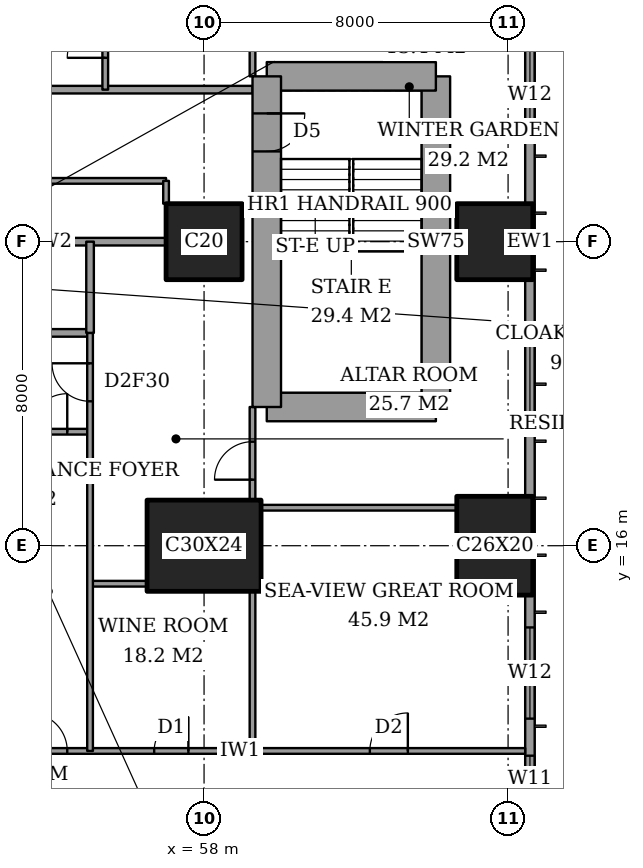
"""IFC4 building model, lengths in metres.
Left out: names, types, materials, properties, quantities, classifications, styles, units other than length and angle.
Written with IfcOpenShell. Run it as: python <this file> out.ifc"""

import sys

from ifc_helpers import new_model, si_unit, direction, frame, frame_2d, origin, origin_2d, place, context, subcontext, project, spatial, rectangle, extrude, element, fill, save


model = new_model("IFC4")
c1 = context("Model", 3, precision=1e-05, world=origin(), true_north=direction((0.0, 1.0)))
c2 = subcontext(c1, "Body", "Model", "MODEL_VIEW")
j1 = project(units=[si_unit("LENGTHUNIT", "METRE"), si_unit("PLANEANGLEUNIT", "RADIAN")], contexts=[c1])
p1 = place(None, origin())
s1 = spatial("IfcSite", under=j1, at=p1, CompositionType="ELEMENT")
p2 = place(p1, origin())
s2 = spatial("IfcBuilding", under=s1, at=p2, CompositionType="ELEMENT")
p3 = place(p2, frame((0.0, 0.0, 139.4)))
s3 = spatial("IfcBuildingStorey", under=s2, at=p3, CompositionType="ELEMENT", Elevation=139.4)
p4 = place(p3, frame((58.0, 16.0, 0.0), z_axis=(0.0, 0.0, 1.0), x_axis=(1.0, 0.0, 0.0)))
e1 = element("IfcColumn", 1, at=p4, inside=s3, PredefinedType="COLUMN", context=c2, shape_type="SweptSolid", body=[
    extrude(rectangle(XDim=3.0, YDim=2.4, at=origin_2d()), origin(), (0.0, 0.0, 1.0), 3.6),
])
p5 = place(p3, frame((58.0, 24.0, 0.0), z_axis=(0.0, 0.0, 1.0), x_axis=(1.0, 0.0, 0.0)))
e2 = element("IfcColumn", 2, at=p5, inside=s3, PredefinedType="COLUMN", context=c2, shape_type="SweptSolid", body=[
    extrude(rectangle(XDim=2.0, YDim=2.0, at=origin_2d()), origin(), (0.0, 0.0, 1.0), 3.6),
])
p6 = place(p3, frame((65.65, 16.0, 0.0), z_axis=(0.0, 0.0, 1.0), x_axis=(0.0, 1.0, 0.0)))
e3 = element("IfcColumn", 3, at=p6, inside=s3, PredefinedType="COLUMN", context=c2, shape_type="SweptSolid", body=[
    extrude(rectangle(XDim=2.6, YDim=2.0, at=origin_2d()), origin(), (0.0, 0.0, 1.0), 3.6),
])
p7 = place(p3, frame((65.65, 24.0, 0.0), z_axis=(0.0, 0.0, 1.0), x_axis=(1.0, 0.0, 0.0)))
e4 = element("IfcColumn", 4, at=p7, inside=s3, PredefinedType="COLUMN", context=c2, shape_type="SweptSolid", body=[
    extrude(rectangle(XDim=2.0, YDim=2.0, at=origin_2d()), origin(), (0.0, 0.0, 1.0), 3.6),
])
p8 = place(p3, frame((59.65, 19.65, 0.0), z_axis=(0.0, 0.0, 1.0), x_axis=(1.0, 0.0, 0.0)))
e5 = element("IfcWall", 5, at=p8, inside=s3, PredefinedType="SHEAR", context=c2, shape_type="SweptSolid", body=[
    extrude(rectangle(XDim=4.45, YDim=0.75, at=frame_2d((2.225, 0.0))), origin(), (0.0, 0.0, 1.0), 3.6),
])
p9 = place(p3, frame((64.1, 19.65, 0.0), z_axis=(0.0, 0.0, 1.0), x_axis=(0.0, 1.0, 0.0)))
e6 = element("IfcWall", 6, at=p9, inside=s3, PredefinedType="SHEAR", context=c2, shape_type="SweptSolid", body=[
    extrude(rectangle(XDim=8.7, YDim=0.75, at=frame_2d((4.35, 0.0))), origin(), (0.0, 0.0, 1.0), 3.6),
])
p10 = place(p3, frame((64.1, 28.35, 0.0), z_axis=(0.0, 0.0, 1.0), x_axis=(-1.0, 0.0, 0.0)))
e7 = element("IfcWall", 7, at=p10, inside=s3, PredefinedType="SHEAR", context=c2, shape_type="SweptSolid", body=[
    extrude(rectangle(XDim=4.45, YDim=0.75, at=frame_2d((2.225, 0.0))), origin(), (0.0, 0.0, 1.0), 3.6),
])
p11 = place(p3, frame((59.65, 28.35, 0.0), z_axis=(0.0, 0.0, 1.0), x_axis=(0.0, -1.0, 0.0)))
e8 = element("IfcWall", 8, at=p11, inside=s3, PredefinedType="SHEAR", context=c2, shape_type="SweptSolid", body=[
    extrude(rectangle(XDim=8.7, YDim=0.75, at=frame_2d((4.35, 0.0))), origin(), (0.0, 0.0, 1.0), 3.6),
])
p12 = place(p11, frame((0.975, 0.0, 0.0)))
e9 = element("IfcOpeningElement", 9, at=p12, cuts=e8, PredefinedType="OPENING", context=c2, shape_type="SweptSolid", body=[
    extrude(rectangle(XDim=1.0, YDim=2.1, at=frame_2d((0.5, 1.05))), frame((0.0, 0.385, 0.0), z_axis=(0.0, -1.0, 0.0), x_axis=(1.0, 0.0, 0.0)), (0.0, 0.0, 1.0), 0.77),
])
p13 = place(p3, frame((66.575, 3.175, 0.0), z_axis=(0.0, 0.0, 1.0), x_axis=(0.0, 1.0, 0.0)))
e10 = element("IfcWall", 10, at=p13, inside=s3, PredefinedType="SOLIDWALL", context=c2, shape_type="SweptSolid", body=[
    extrude(rectangle(XDim=41.65, YDim=0.25, at=frame_2d((20.825, 0.0))), origin(), (0.0, 0.0, 1.0), 3.6),
])
p14 = place(p13, frame((0.775, 0.0, 0.4)))
e11 = element("IfcOpeningElement", 11, at=p14, cuts=e10, PredefinedType="OPENING", context=c2, shape_type="SweptSolid", body=[
    extrude(rectangle(XDim=2.4, YDim=2.2, at=frame_2d((1.2, 1.1))), frame((0.0, 0.135, 0.0), z_axis=(0.0, -1.0, 0.0), x_axis=(1.0, 0.0, 0.0)), (0.0, 0.0, 1.0), 0.27),
])
p15 = place(p13, frame((6.1, 0.0, 0.4)))
e12 = element("IfcOpeningElement", 12, at=p15, cuts=e10, PredefinedType="OPENING", context=c2, shape_type="SweptSolid", body=[
    extrude(rectangle(XDim=1.2, YDim=2.2, at=frame_2d((0.6, 1.1))), frame((0.0, 0.135, 0.0), z_axis=(0.0, -1.0, 0.0), x_axis=(1.0, 0.0, 0.0)), (0.0, 0.0, 1.0), 0.27),
])
p16 = place(p13, frame((8.275, 0.0, 0.4)))
e13 = element("IfcOpeningElement", 13, at=p16, cuts=e10, PredefinedType="OPENING", context=c2, shape_type="SweptSolid", body=[
    extrude(rectangle(XDim=2.4, YDim=2.2, at=frame_2d((1.2, 1.1))), frame((0.0, 0.135, 0.0), z_axis=(0.0, -1.0, 0.0), x_axis=(1.0, 0.0, 0.0)), (0.0, 0.0, 1.0), 0.27),
])
p17 = place(p13, frame((15.775, 0.0, 0.4)))
e14 = element("IfcOpeningElement", 14, at=p17, cuts=e10, PredefinedType="OPENING", context=c2, shape_type="SweptSolid", body=[
    extrude(rectangle(XDim=2.4, YDim=2.2, at=frame_2d((1.2, 1.1))), frame((0.0, 0.135, 0.0), z_axis=(0.0, -1.0, 0.0), x_axis=(1.0, 0.0, 0.0)), (0.0, 0.0, 1.0), 0.27),
])
p18 = place(p13, frame((23.475, 0.0, 0.4)))
e15 = element("IfcOpeningElement", 15, at=p18, cuts=e10, PredefinedType="OPENING", context=c2, shape_type="SweptSolid", body=[
    extrude(rectangle(XDim=2.4, YDim=2.2, at=frame_2d((1.2, 1.1))), frame((0.0, 0.135, 0.0), z_axis=(0.0, -1.0, 0.0), x_axis=(1.0, 0.0, 0.0)), (0.0, 0.0, 1.0), 0.27),
])
p19 = place(p13, frame((30.975, 0.0, 0.4)))
e16 = element("IfcOpeningElement", 16, at=p19, cuts=e10, PredefinedType="OPENING", context=c2, shape_type="SweptSolid", body=[
    extrude(rectangle(XDim=2.4, YDim=2.2, at=frame_2d((1.2, 1.1))), frame((0.0, 0.135, 0.0), z_axis=(0.0, -1.0, 0.0), x_axis=(1.0, 0.0, 0.0)), (0.0, 0.0, 1.0), 0.27),
])
p20 = place(p13, frame((34.5, 0.0, 0.4)))
e17 = element("IfcOpeningElement", 17, at=p20, cuts=e10, PredefinedType="OPENING", context=c2, shape_type="SweptSolid", body=[
    extrude(rectangle(XDim=1.2, YDim=2.2, at=frame_2d((0.6, 1.1))), frame((0.0, 0.135, 0.0), z_axis=(0.0, -1.0, 0.0), x_axis=(1.0, 0.0, 0.0)), (0.0, 0.0, 1.0), 0.27),
])
p21 = place(p13, frame((38.475, 0.0, 0.4)))
e18 = element("IfcOpeningElement", 18, at=p21, cuts=e10, PredefinedType="OPENING", context=c2, shape_type="SweptSolid", body=[
    extrude(rectangle(XDim=2.4, YDim=2.2, at=frame_2d((1.2, 1.1))), frame((0.0, 0.135, 0.0), z_axis=(0.0, -1.0, 0.0), x_axis=(1.0, 0.0, 0.0)), (0.0, 0.0, 1.0), 0.27),
])
p22 = place(p3, frame((41.439, 10.6, 0.0), z_axis=(0.0, 0.0, 1.0), x_axis=(1.0, 0.0, 0.0)))
e19 = element("IfcWall", 19, at=p22, inside=s3, PredefinedType="PARTITIONING", context=c2, shape_type="SweptSolid", body=[
    extrude(rectangle(XDim=25.011, YDim=0.15, at=frame_2d((12.505, 0.0))), origin(), (0.0, 0.0, 1.0), 3.35),
])
p23 = place(p22, frame((11.961, 0.0, 0.0)))
e20 = element("IfcOpeningElement", 20, at=p23, cuts=e19, PredefinedType="OPENING", context=c2, shape_type="SweptSolid", body=[
    extrude(rectangle(XDim=1.0, YDim=2.1, at=frame_2d((0.5, 1.05))), frame((0.0, 0.085, 0.0), z_axis=(0.0, -1.0, 0.0), x_axis=(1.0, 0.0, 0.0)), (0.0, 0.0, 1.0), 0.17),
])
p24 = place(p22, frame((20.924, 0.0, 0.0)))
e21 = element("IfcOpeningElement", 21, at=p24, cuts=e19, PredefinedType="OPENING", context=c2, shape_type="SweptSolid", body=[
    extrude(rectangle(XDim=1.0, YDim=2.1, at=frame_2d((0.5, 1.05))), frame((0.0, 0.085, 0.0), z_axis=(0.0, -1.0, 0.0), x_axis=(1.0, 0.0, 0.0)), (0.0, 0.0, 1.0), 0.17),
])
p25 = place(p22, frame((15.249, 0.0, 0.0)))
e22 = element("IfcOpeningElement", 22, at=p25, cuts=e19, PredefinedType="OPENING", context=c2, shape_type="SweptSolid", body=[
    extrude(rectangle(XDim=0.9, YDim=2.1, at=frame_2d((0.45, 1.05))), frame((0.0, 0.085, 0.0), z_axis=(0.0, -1.0, 0.0), x_axis=(1.0, 0.0, 0.0)), (0.0, 0.0, 1.0), 0.17),
])
p26 = place(p22, frame((9.661, 0.0, 0.0)))
e23 = element("IfcOpeningElement", 23, at=p26, cuts=e19, PredefinedType="OPENING", context=c2, shape_type="SweptSolid", body=[
    extrude(rectangle(XDim=1.0, YDim=2.1, at=frame_2d((0.5, 1.05))), frame((0.0, 0.085, 0.0), z_axis=(0.0, -1.0, 0.0), x_axis=(1.0, 0.0, 0.0)), (0.0, 0.0, 1.0), 0.17),
])
p27 = place(p22, frame((7.311, 0.0, 0.0)))
e24 = element("IfcOpeningElement", 24, at=p27, cuts=e19, PredefinedType="OPENING", context=c2, shape_type="SweptSolid", body=[
    extrude(rectangle(XDim=0.9, YDim=2.1, at=frame_2d((0.45, 1.05))), frame((0.0, 0.085, 0.0), z_axis=(0.0, -1.0, 0.0), x_axis=(1.0, 0.0, 0.0)), (0.0, 0.0, 1.0), 0.17),
])
p28 = place(p22, frame((2.836, 0.0, 0.0)))
e25 = element("IfcOpeningElement", 25, at=p28, cuts=e19, PredefinedType="OPENING", context=c2, shape_type="SweptSolid", body=[
    extrude(rectangle(XDim=1.0, YDim=2.1, at=frame_2d((0.5, 1.05))), frame((0.0, 0.085, 0.0), z_axis=(0.0, -1.0, 0.0), x_axis=(1.0, 0.0, 0.0)), (0.0, 0.0, 1.0), 0.17),
])
p29 = place(p3, frame((55.0, 15.0, 0.0), z_axis=(0.0, 0.0, 1.0), x_axis=(1.0, 0.0, 0.0)))
e26 = element("IfcWall", 26, at=p29, inside=s3, PredefinedType="PARTITIONING", context=c2, shape_type="SweptSolid", body=[
    extrude(rectangle(XDim=1.5, YDim=0.15, at=frame_2d((0.75, 0.0))), origin(), (0.0, 0.0, 1.0), 3.35),
])
p30 = place(p3, frame((59.5, 17.0, 0.0), z_axis=(0.0, 0.0, 1.0), x_axis=(1.0, 0.0, 0.0)))
e27 = element("IfcWall", 27, at=p30, inside=s3, PredefinedType="PARTITIONING", context=c2, shape_type="SweptSolid", body=[
    extrude(rectangle(XDim=5.15, YDim=0.15, at=frame_2d((2.575, 0.0))), origin(), (0.0, 0.0, 1.0), 3.35),
])
p31 = place(p3, frame((51.6, 19.0, 0.0), z_axis=(0.0, 0.0, 1.0), x_axis=(1.0, 0.0, 0.0)))
e28 = element("IfcWall", 28, at=p31, inside=s3, PredefinedType="PARTITIONING", context=c2, shape_type="SweptSolid", body=[
    extrude(rectangle(XDim=3.4, YDim=0.15, at=frame_2d((1.7, 0.0))), origin(), (0.0, 0.0, 1.0), 3.35),
])
p32 = place(p31, frame((1.8, 0.0, 0.0)))
e29 = element("IfcOpeningElement", 29, at=p32, cuts=e28, PredefinedType="OPENING", context=c2, shape_type="SweptSolid", body=[
    extrude(rectangle(XDim=1.0, YDim=2.1, at=frame_2d((0.5, 1.05))), frame((0.0, 0.085, 0.0), z_axis=(0.0, -1.0, 0.0), x_axis=(1.0, 0.0, 0.0)), (0.0, 0.0, 1.0), 0.17),
])
p33 = place(p3, frame((51.2, 21.6, 0.0), z_axis=(0.0, 0.0, 1.0), x_axis=(1.0, 0.0, 0.0)))
e30 = element("IfcWall", 30, at=p33, inside=s3, PredefinedType="PARTITIONING", context=c2, shape_type="SweptSolid", body=[
    extrude(rectangle(XDim=3.8, YDim=0.2, at=frame_2d((1.9, 0.0))), origin(), (0.0, 0.0, 1.0), 3.35),
])
p34 = place(p33, frame((1.45, 0.0, 0.0)))
e31 = element("IfcOpeningElement", 31, at=p34, cuts=e30, PredefinedType="OPENING", context=c2, shape_type="SweptSolid", body=[
    extrude(rectangle(XDim=0.9, YDim=2.1, at=frame_2d((0.45, 1.05))), frame((0.0, 0.11, 0.0), z_axis=(0.0, -1.0, 0.0), x_axis=(1.0, 0.0, 0.0)), (0.0, 0.0, 1.0), 0.22),
])
p35 = place(p3, frame((51.0, 24.0, 0.0), z_axis=(0.0, 0.0, 1.0), x_axis=(1.0, 0.0, 0.0)))
e32 = element("IfcWall", 32, at=p35, inside=s3, PredefinedType="PARTITIONING", context=c2, shape_type="SweptSolid", body=[
    extrude(rectangle(XDim=6.0, YDim=0.2, at=frame_2d((3.0, 0.0))), origin(), (0.0, 0.0, 1.0), 3.35),
])
p36 = place(p3, frame((48.6, 25.6, 0.0), z_axis=(0.0, 0.0, 1.0), x_axis=(1.0, 0.0, 0.0)))
e33 = element("IfcWall", 33, at=p36, inside=s3, PredefinedType="PARTITIONING", context=c2, shape_type="SweptSolid", body=[
    extrude(rectangle(XDim=8.4, YDim=0.15, at=frame_2d((4.2, 0.0))), origin(), (0.0, 0.0, 1.0), 3.35),
])
p37 = place(p36, frame((3.75, 0.0, 0.0)))
e34 = element("IfcOpeningElement", 34, at=p37, cuts=e33, PredefinedType="OPENING", context=c2, shape_type="SweptSolid", body=[
    extrude(rectangle(XDim=0.9, YDim=2.1, at=frame_2d((0.45, 1.05))), frame((0.0, 0.085, 0.0), z_axis=(0.0, -1.0, 0.0), x_axis=(1.0, 0.0, 0.0)), (0.0, 0.0, 1.0), 0.17),
])
p38 = place(p3, frame((42.0, 28.0, 0.0), z_axis=(0.0, 0.0, 1.0), x_axis=(1.0, 0.0, 0.0)))
e35 = element("IfcWall", 35, at=p38, inside=s3, PredefinedType="PARTITIONING", context=c2, shape_type="SweptSolid", body=[
    extrude(rectangle(XDim=17.275, YDim=0.2, at=frame_2d((8.637, 0.0))), origin(), (0.0, 0.0, 1.0), 3.35),
])
p39 = place(p38, frame((9.1, 0.0, 0.0)))
e36 = element("IfcOpeningElement", 36, at=p39, cuts=e35, PredefinedType="OPENING", context=c2, shape_type="SweptSolid", body=[
    extrude(rectangle(XDim=1.2, YDim=2.4, at=frame_2d((0.6, 1.2))), frame((0.0, 0.11, 0.0), z_axis=(0.0, -1.0, 0.0), x_axis=(1.0, 0.0, 0.0)), (0.0, 0.0, 1.0), 0.22),
])
p40 = place(p3, frame((55.0, 21.6, 0.0), z_axis=(0.0, 0.0, 1.0), x_axis=(0.0, 1.0, 0.0)))
e37 = element("IfcWall", 37, at=p40, inside=s3, PredefinedType="PARTITIONING", context=c2, shape_type="SweptSolid", body=[
    extrude(rectangle(XDim=2.4, YDim=0.2, at=frame_2d((1.2, 0.0))), origin(), (0.0, 0.0, 1.0), 3.35),
])
p41 = place(p3, frame((55.0, 10.6, 0.0), z_axis=(0.0, 0.0, 1.0), x_axis=(0.0, 1.0, 0.0)))
e38 = element("IfcWall", 38, at=p41, inside=s3, PredefinedType="PARTITIONING", context=c2, shape_type="SweptSolid", body=[
    extrude(rectangle(XDim=11.0, YDim=0.15, at=frame_2d((5.5, 0.0))), origin(), (0.0, 0.0, 1.0), 3.35),
])
p42 = place(p41, frame((9.2, 0.0, 0.0)))
e39 = element("IfcOpeningElement", 39, at=p42, cuts=e38, PredefinedType="OPENING", context=c2, shape_type="SweptSolid", body=[
    extrude(rectangle(XDim=1.0, YDim=2.1, at=frame_2d((0.5, 1.05))), frame((0.0, 0.085, 0.0), z_axis=(0.0, -1.0, 0.0), x_axis=(1.0, 0.0, 0.0)), (0.0, 0.0, 1.0), 0.17),
])
p43 = place(p3, frame((55.4, 28.0, 0.0), z_axis=(0.0, 0.0, 1.0), x_axis=(0.0, 1.0, 0.0)))
e40 = element("IfcWall", 40, at=p43, inside=s3, PredefinedType="PARTITIONING", context=c2, shape_type="SweptSolid", body=[
    extrude(rectangle(XDim=9.4, YDim=0.15, at=frame_2d((4.7, 0.0))), origin(), (0.0, 0.0, 1.0), 3.35),
])
p44 = place(p43, frame((0.837, 0.0, 0.0)))
e41 = element("IfcOpeningElement", 41, at=p44, cuts=e40, PredefinedType="OPENING", context=c2, shape_type="SweptSolid", body=[
    extrude(rectangle(XDim=1.0, YDim=2.1, at=frame_2d((0.5, 1.05))), frame((0.0, 0.085, 0.0), z_axis=(0.0, -1.0, 0.0), x_axis=(1.0, 0.0, 0.0)), (0.0, 0.0, 1.0), 0.17),
])
p45 = place(p3, frame((57.0, 25.0, 0.0), z_axis=(0.0, 0.0, 1.0), x_axis=(0.0, 1.0, 0.0)))
e42 = element("IfcWall", 42, at=p45, inside=s3, PredefinedType="PARTITIONING", context=c2, shape_type="SweptSolid", body=[
    extrude(rectangle(XDim=0.6, YDim=0.15, at=frame_2d((0.3, 0.0))), origin(), (0.0, 0.0, 1.0), 3.35),
])
p46 = place(p3, frame((59.275, 10.6, 0.0), z_axis=(0.0, 0.0, 1.0), x_axis=(0.0, 1.0, 0.0)))
e43 = element("IfcWall", 43, at=p46, inside=s3, PredefinedType="PARTITIONING", context=c2, shape_type="SweptSolid", body=[
    extrude(rectangle(XDim=4.2, YDim=0.15, at=frame_2d((2.1, 0.0))), origin(), (0.0, 0.0, 1.0), 3.35),
])
p47 = place(p3, frame((59.275, 17.2, 0.0), z_axis=(0.0, 0.0, 1.0), x_axis=(0.0, 1.0, 0.0)))
e44 = element("IfcWall", 44, at=p47, inside=s3, PredefinedType="PARTITIONING", context=c2, shape_type="SweptSolid", body=[
    extrude(rectangle(XDim=2.45, YDim=0.15, at=frame_2d((1.225, 0.0))), origin(), (0.0, 0.0, 1.0), 3.35),
])
p48 = place(p47, frame((0.538, 0.0, 0.0)))
e45 = element("IfcOpeningElement", 45, at=p48, cuts=e44, PredefinedType="OPENING", context=c2, shape_type="SweptSolid", body=[
    extrude(rectangle(XDim=1.0, YDim=2.1, at=frame_2d((0.5, 1.05))), frame((0.0, 0.085, 0.0), z_axis=(0.0, -1.0, 0.0), x_axis=(1.0, 0.0, 0.0)), (0.0, 0.0, 1.0), 0.17),
])
p49 = place(p3, frame((59.275, 28.35, 0.0), z_axis=(0.0, 0.0, 1.0), x_axis=(0.0, 1.0, 0.0)))
e46 = element("IfcWall", 46, at=p49, inside=s3, PredefinedType="PARTITIONING", context=c2, shape_type="SweptSolid", body=[
    extrude(rectangle(XDim=2.45, YDim=0.15, at=frame_2d((1.225, 0.0))), origin(), (0.0, 0.0, 1.0), 3.35),
])
p50 = place(p49, frame((0.913, 0.0, 0.0)))
e47 = element("IfcOpeningElement", 47, at=p50, cuts=e46, PredefinedType="OPENING", context=c2, shape_type="SweptSolid", body=[
    extrude(rectangle(XDim=1.0, YDim=2.1, at=frame_2d((0.5, 1.05))), frame((0.0, 0.085, 0.0), z_axis=(0.0, -1.0, 0.0), x_axis=(1.0, 0.0, 0.0)), (0.0, 0.0, 1.0), 0.17),
])
p51 = place(p15, origin())
e48 = element("IfcWindow", 48, at=p51, inside=s3, PartitioningType="SINGLE_PANEL", PredefinedType="WINDOW", context=c2, shape_type="SweptSolid", body=[
    extrude(rectangle(XDim=1.2, YDim=2.2, at=frame_2d((0.6, 1.1))), frame((0.0, 0.03, 0.0), z_axis=(0.0, -1.0, 0.0), x_axis=(1.0, 0.0, 0.0)), (0.0, 0.0, 1.0), 0.06),
])
fill(e12, e48)
p52 = place(p16, origin())
e49 = element("IfcWindow", 49, at=p52, inside=s3, PartitioningType="SINGLE_PANEL", PredefinedType="WINDOW", context=c2, shape_type="SweptSolid", body=[
    extrude(rectangle(XDim=2.4, YDim=2.2, at=frame_2d((1.2, 1.1))), frame((0.0, 0.03, 0.0), z_axis=(0.0, -1.0, 0.0), x_axis=(1.0, 0.0, 0.0)), (0.0, 0.0, 1.0), 0.06),
])
fill(e13, e49)
p53 = place(p17, origin())
e50 = element("IfcWindow", 50, at=p53, inside=s3, PartitioningType="SINGLE_PANEL", PredefinedType="WINDOW", context=c2, shape_type="SweptSolid", body=[
    extrude(rectangle(XDim=2.4, YDim=2.2, at=frame_2d((1.2, 1.1))), frame((0.0, 0.03, 0.0), z_axis=(0.0, -1.0, 0.0), x_axis=(1.0, 0.0, 0.0)), (0.0, 0.0, 1.0), 0.06),
])
fill(e14, e50)
p54 = place(p18, origin())
e51 = element("IfcWindow", 51, at=p54, inside=s3, PartitioningType="SINGLE_PANEL", PredefinedType="WINDOW", context=c2, shape_type="SweptSolid", body=[
    extrude(rectangle(XDim=2.4, YDim=2.2, at=frame_2d((1.2, 1.1))), frame((0.0, 0.03, 0.0), z_axis=(0.0, -1.0, 0.0), x_axis=(1.0, 0.0, 0.0)), (0.0, 0.0, 1.0), 0.06),
])
fill(e15, e51)
p55 = place(p23, origin())
e52 = element("IfcDoor", 52, at=p55, inside=s3, OperationType="SINGLE_SWING_RIGHT", PredefinedType="DOOR", context=c2, shape_type="SweptSolid", body=[
    extrude(rectangle(XDim=1.0, YDim=2.1, at=frame_2d((0.5, 1.05))), frame((0.0, 0.025, 0.0), z_axis=(0.0, -1.0, 0.0), x_axis=(1.0, 0.0, 0.0)), (0.0, 0.0, 1.0), 0.05),
])
fill(e20, e52)
p56 = place(p24, origin())
e53 = element("IfcDoor", 53, at=p56, inside=s3, OperationType="SINGLE_SWING_LEFT", PredefinedType="DOOR", context=c2, shape_type="SweptSolid", body=[
    extrude(rectangle(XDim=1.0, YDim=2.1, at=frame_2d((0.5, 1.05))), frame((0.0, 0.025, 0.0), z_axis=(0.0, -1.0, 0.0), x_axis=(1.0, 0.0, 0.0)), (0.0, 0.0, 1.0), 0.05),
])
fill(e21, e53)
p57 = place(p48, origin())
e54 = element("IfcDoor", 54, at=p57, inside=s3, OperationType="SINGLE_SWING_RIGHT", PredefinedType="DOOR", context=c2, shape_type="SweptSolid", body=[
    extrude(rectangle(XDim=1.0, YDim=2.1, at=frame_2d((0.5, 1.05))), frame((0.0, 0.025, 0.0), z_axis=(0.0, -1.0, 0.0), x_axis=(1.0, 0.0, 0.0)), (0.0, 0.0, 1.0), 0.05),
])
fill(e45, e54)
p58 = place(p25, origin())
e55 = element("IfcDoor", 55, at=p58, inside=s3, OperationType="SINGLE_SWING_LEFT", PredefinedType="DOOR", context=c2, shape_type="SweptSolid", body=[
    extrude(rectangle(XDim=0.9, YDim=2.1, at=frame_2d((0.45, 1.05))), frame((0.0, 0.025, 0.0), z_axis=(0.0, -1.0, 0.0), x_axis=(1.0, 0.0, 0.0)), (0.0, 0.0, 1.0), 0.05),
])
fill(e22, e55)
p59 = place(p42, origin())
e56 = element("IfcDoor", 56, at=p59, inside=s3, OperationType="SINGLE_SWING_LEFT", PredefinedType="DOOR", context=c2, shape_type="SweptSolid", body=[
    extrude(rectangle(XDim=1.0, YDim=2.1, at=frame_2d((0.5, 1.05))), frame((0.0, 0.025, 0.0), z_axis=(0.0, -1.0, 0.0), x_axis=(1.0, 0.0, 0.0)), (0.0, 0.0, 1.0), 0.05),
])
fill(e39, e56)
p60 = place(p32, origin())
e57 = element("IfcDoor", 57, at=p60, inside=s3, OperationType="SINGLE_SWING_LEFT", PredefinedType="DOOR", context=c2, shape_type="SweptSolid", body=[
    extrude(rectangle(XDim=1.0, YDim=2.1, at=frame_2d((0.5, 1.05))), frame((0.0, 0.025, 0.0), z_axis=(0.0, -1.0, 0.0), x_axis=(1.0, 0.0, 0.0)), (0.0, 0.0, 1.0), 0.05),
])
fill(e29, e57)
p61 = place(p44, origin())
e58 = element("IfcDoor", 58, at=p61, inside=s3, OperationType="SINGLE_SWING_RIGHT", PredefinedType="DOOR", context=c2, shape_type="SweptSolid", body=[
    extrude(rectangle(XDim=1.0, YDim=2.1, at=frame_2d((0.5, 1.05))), frame((0.0, 0.025, 0.0), z_axis=(0.0, -1.0, 0.0), x_axis=(1.0, 0.0, 0.0)), (0.0, 0.0, 1.0), 0.05),
])
fill(e41, e58)
p62 = place(p12, origin())
e59 = element("IfcDoor", 59, at=p62, inside=s3, OperationType="SINGLE_SWING_RIGHT", PredefinedType="DOOR", context=c2, shape_type="SweptSolid", body=[
    extrude(rectangle(XDim=1.0, YDim=2.1, at=frame_2d((0.5, 1.05))), frame((0.0, 0.025, 0.0), z_axis=(0.0, -1.0, 0.0), x_axis=(1.0, 0.0, 0.0)), (0.0, 0.0, 1.0), 0.05),
])
fill(e9, e59)
save(model, sys.argv[1])
